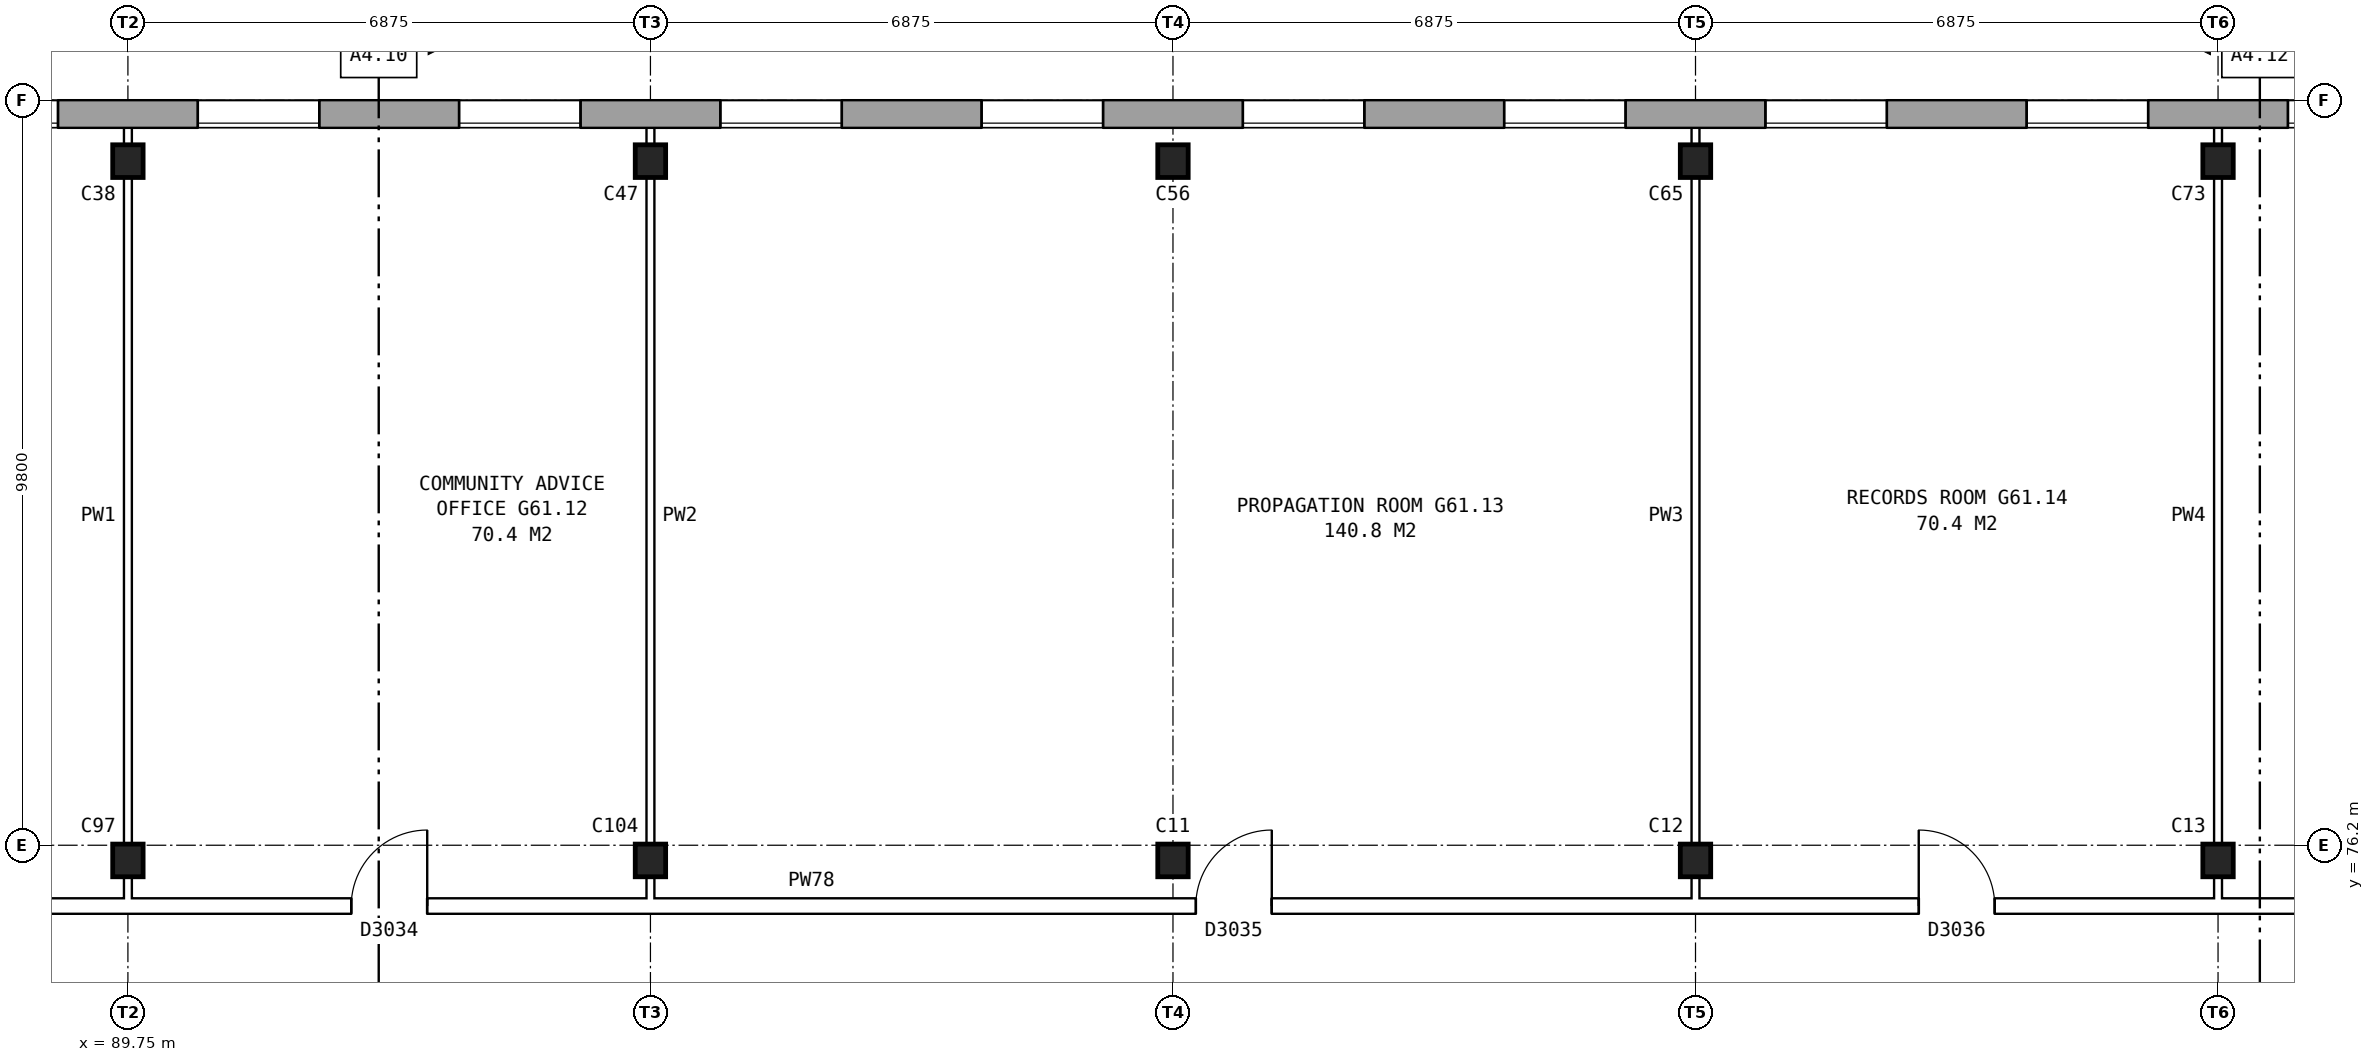
"""IFC4 building model, lengths in metres.
Left out: names, types, materials, properties, quantities, classifications, styles, units other than length and angle.
Written with IfcOpenShell. Run it as: python <this file> out.ifc"""

import sys

from ifc_helpers import new_model, si_unit, direction, frame, frame_2d, origin, origin_2d, place, context, subcontext, project, spatial, rectangle, i_section, extrude, element, fill, save


model = new_model("IFC4")
c1 = context("Model", 3, precision=1e-05, world=origin(), true_north=direction((0.0, 1.0)))
c2 = subcontext(c1, "Body", "Model", "MODEL_VIEW")
j1 = project(units=[si_unit("LENGTHUNIT", "METRE"), si_unit("PLANEANGLEUNIT", "RADIAN")], contexts=[c1])
p1 = place(None, origin())
s1 = spatial("IfcSite", under=j1, at=p1, CompositionType="ELEMENT")
p2 = place(p1, origin())
s2 = spatial("IfcBuilding", under=s1, at=p2, CompositionType="ELEMENT")
p3 = place(p2, frame((0.0, 0.0, 215.2)))
s3 = spatial("IfcBuildingStorey", under=s2, at=p3, CompositionType="ELEMENT", Elevation=215.2)
for number, where, z_axis, x_axis in (
    (1, (89.75, 76.0, 0.0), (0.0, 0.0, 1.0), (1.0, 0.0, 0.0)),
    (2, (96.625, 76.0, 0.0), (0.0, 0.0, 1.0), (1.0, 0.0, 0.0)),
    (3, (103.5, 76.0, 0.0), (0.0, 0.0, 1.0), (1.0, 0.0, 0.0)),
    (4, (110.375, 76.0, 0.0), (0.0, 0.0, 1.0), (1.0, 0.0, 0.0)),
    (5, (117.25, 76.0, 0.0), (0.0, 0.0, 1.0), (1.0, 0.0, 0.0)),
    (6, (89.75, 85.2, 0.0), (0.0, 0.0, 1.0), (1.0, 0.0, 0.0)),
    (7, (96.625, 85.2, 0.0), (0.0, 0.0, 1.0), (1.0, 0.0, 0.0)),
    (8, (103.5, 85.2, 0.0), (0.0, 0.0, 1.0), (1.0, 0.0, 0.0)),
    (9, (110.375, 85.2, 0.0), (0.0, 0.0, 1.0), (1.0, 0.0, 0.0)),
    (10, (117.25, 85.2, 0.0), (0.0, 0.0, 1.0), (1.0, 0.0, 0.0)),
):
    element("IfcColumn", number, at=place(p3, frame(where, z_axis=z_axis, x_axis=x_axis)), inside=s3, PredefinedType="COLUMN", context=c2, shape_type="SweptSolid", body=[
        extrude(i_section(OverallWidth=0.4, OverallDepth=0.43, WebThickness=0.04, FlangeThickness=0.04, at=origin_2d()), origin(), (0.0, 0.0, 1.0), 5.6),
    ])
p4 = place(p3, frame((131.05, 85.82, 0.0), z_axis=(0.0, 0.0, 1.0), x_axis=(-1.0, 0.0, 0.0)))
e11 = element("IfcWall", 11, at=p4, inside=s3, PredefinedType="STANDARD", context=c2, shape_type="SweptSolid", body=[
    extrude(rectangle(XDim=55.1, YDim=0.36, at=frame_2d((27.55, 0.0))), origin(), (0.0, 0.0, 1.0), 5.6),
])
p5 = place(p4, frame((0.969, 0.0, 0.15)))
e12 = element("IfcOpeningElement", 12, at=p5, cuts=e11, PredefinedType="OPENING", context=c2, shape_type="SweptSolid", body=[
    extrude(rectangle(XDim=1.6, YDim=2.4, at=frame_2d((0.8, 1.2))), frame((0.0, 0.19, 0.0), z_axis=(0.0, -1.0, 0.0), x_axis=(1.0, 0.0, 0.0)), (0.0, 0.0, 1.0), 0.38),
])
p6 = place(p4, frame((4.406, 0.0, 0.15)))
e13 = element("IfcOpeningElement", 13, at=p6, cuts=e11, PredefinedType="OPENING", context=c2, shape_type="SweptSolid", body=[
    extrude(rectangle(XDim=1.6, YDim=2.4, at=frame_2d((0.8, 1.2))), frame((0.0, 0.19, 0.0), z_axis=(0.0, -1.0, 0.0), x_axis=(1.0, 0.0, 0.0)), (0.0, 0.0, 1.0), 0.38),
])
p7 = place(p4, frame((7.844, 0.0, 0.15)))
e14 = element("IfcOpeningElement", 14, at=p7, cuts=e11, PredefinedType="OPENING", context=c2, shape_type="SweptSolid", body=[
    extrude(rectangle(XDim=1.6, YDim=2.4, at=frame_2d((0.8, 1.2))), frame((0.0, 0.19, 0.0), z_axis=(0.0, -1.0, 0.0), x_axis=(1.0, 0.0, 0.0)), (0.0, 0.0, 1.0), 0.38),
])
p8 = place(p4, frame((11.281, 0.0, 0.15)))
e15 = element("IfcOpeningElement", 15, at=p8, cuts=e11, PredefinedType="OPENING", context=c2, shape_type="SweptSolid", body=[
    extrude(rectangle(XDim=1.6, YDim=2.4, at=frame_2d((0.8, 1.2))), frame((0.0, 0.19, 0.0), z_axis=(0.0, -1.0, 0.0), x_axis=(1.0, 0.0, 0.0)), (0.0, 0.0, 1.0), 0.38),
])
p9 = place(p4, frame((14.719, 0.0, 0.15)))
e16 = element("IfcOpeningElement", 16, at=p9, cuts=e11, PredefinedType="OPENING", context=c2, shape_type="SweptSolid", body=[
    extrude(rectangle(XDim=1.6, YDim=2.4, at=frame_2d((0.8, 1.2))), frame((0.0, 0.19, 0.0), z_axis=(0.0, -1.0, 0.0), x_axis=(1.0, 0.0, 0.0)), (0.0, 0.0, 1.0), 0.38),
])
p10 = place(p4, frame((18.156, 0.0, 0.15)))
e17 = element("IfcOpeningElement", 17, at=p10, cuts=e11, PredefinedType="OPENING", context=c2, shape_type="SweptSolid", body=[
    extrude(rectangle(XDim=1.6, YDim=2.4, at=frame_2d((0.8, 1.2))), frame((0.0, 0.19, 0.0), z_axis=(0.0, -1.0, 0.0), x_axis=(1.0, 0.0, 0.0)), (0.0, 0.0, 1.0), 0.38),
])
p11 = place(p4, frame((21.594, 0.0, 0.15)))
e18 = element("IfcOpeningElement", 18, at=p11, cuts=e11, PredefinedType="OPENING", context=c2, shape_type="SweptSolid", body=[
    extrude(rectangle(XDim=1.6, YDim=2.4, at=frame_2d((0.8, 1.2))), frame((0.0, 0.19, 0.0), z_axis=(0.0, -1.0, 0.0), x_axis=(1.0, 0.0, 0.0)), (0.0, 0.0, 1.0), 0.38),
])
p12 = place(p4, frame((25.031, 0.0, 0.15)))
e19 = element("IfcOpeningElement", 19, at=p12, cuts=e11, PredefinedType="OPENING", context=c2, shape_type="SweptSolid", body=[
    extrude(rectangle(XDim=1.6, YDim=2.4, at=frame_2d((0.8, 1.2))), frame((0.0, 0.19, 0.0), z_axis=(0.0, -1.0, 0.0), x_axis=(1.0, 0.0, 0.0)), (0.0, 0.0, 1.0), 0.38),
])
p13 = place(p4, frame((28.469, 0.0, 0.15)))
e20 = element("IfcOpeningElement", 20, at=p13, cuts=e11, PredefinedType="OPENING", context=c2, shape_type="SweptSolid", body=[
    extrude(rectangle(XDim=1.6, YDim=2.4, at=frame_2d((0.8, 1.2))), frame((0.0, 0.19, 0.0), z_axis=(0.0, -1.0, 0.0), x_axis=(1.0, 0.0, 0.0)), (0.0, 0.0, 1.0), 0.38),
])
p14 = place(p4, frame((31.906, 0.0, 0.15)))
e21 = element("IfcOpeningElement", 21, at=p14, cuts=e11, PredefinedType="OPENING", context=c2, shape_type="SweptSolid", body=[
    extrude(rectangle(XDim=1.6, YDim=2.4, at=frame_2d((0.8, 1.2))), frame((0.0, 0.19, 0.0), z_axis=(0.0, -1.0, 0.0), x_axis=(1.0, 0.0, 0.0)), (0.0, 0.0, 1.0), 0.38),
])
p15 = place(p4, frame((35.344, 0.0, 0.15)))
e22 = element("IfcOpeningElement", 22, at=p15, cuts=e11, PredefinedType="OPENING", context=c2, shape_type="SweptSolid", body=[
    extrude(rectangle(XDim=1.6, YDim=2.4, at=frame_2d((0.8, 1.2))), frame((0.0, 0.19, 0.0), z_axis=(0.0, -1.0, 0.0), x_axis=(1.0, 0.0, 0.0)), (0.0, 0.0, 1.0), 0.38),
])
p16 = place(p4, frame((38.781, 0.0, 0.15)))
e23 = element("IfcOpeningElement", 23, at=p16, cuts=e11, PredefinedType="OPENING", context=c2, shape_type="SweptSolid", body=[
    extrude(rectangle(XDim=1.6, YDim=2.4, at=frame_2d((0.8, 1.2))), frame((0.0, 0.19, 0.0), z_axis=(0.0, -1.0, 0.0), x_axis=(1.0, 0.0, 0.0)), (0.0, 0.0, 1.0), 0.38),
])
p17 = place(p4, frame((42.219, 0.0, 0.15)))
e24 = element("IfcOpeningElement", 24, at=p17, cuts=e11, PredefinedType="OPENING", context=c2, shape_type="SweptSolid", body=[
    extrude(rectangle(XDim=1.6, YDim=2.4, at=frame_2d((0.8, 1.2))), frame((0.0, 0.19, 0.0), z_axis=(0.0, -1.0, 0.0), x_axis=(1.0, 0.0, 0.0)), (0.0, 0.0, 1.0), 0.38),
])
p18 = place(p4, frame((45.656, 0.0, 0.15)))
e25 = element("IfcOpeningElement", 25, at=p18, cuts=e11, PredefinedType="OPENING", context=c2, shape_type="SweptSolid", body=[
    extrude(rectangle(XDim=1.6, YDim=2.4, at=frame_2d((0.8, 1.2))), frame((0.0, 0.19, 0.0), z_axis=(0.0, -1.0, 0.0), x_axis=(1.0, 0.0, 0.0)), (0.0, 0.0, 1.0), 0.38),
])
p19 = place(p4, frame((49.094, 0.0, 0.15)))
e26 = element("IfcOpeningElement", 26, at=p19, cuts=e11, PredefinedType="OPENING", context=c2, shape_type="SweptSolid", body=[
    extrude(rectangle(XDim=1.6, YDim=2.4, at=frame_2d((0.8, 1.2))), frame((0.0, 0.19, 0.0), z_axis=(0.0, -1.0, 0.0), x_axis=(1.0, 0.0, 0.0)), (0.0, 0.0, 1.0), 0.38),
])
p20 = place(p4, frame((52.531, 0.0, 0.15)))
e27 = element("IfcOpeningElement", 27, at=p20, cuts=e11, PredefinedType="OPENING", context=c2, shape_type="SweptSolid", body=[
    extrude(rectangle(XDim=1.6, YDim=2.4, at=frame_2d((0.8, 1.2))), frame((0.0, 0.19, 0.0), z_axis=(0.0, -1.0, 0.0), x_axis=(1.0, 0.0, 0.0)), (0.0, 0.0, 1.0), 0.38),
])
p21 = place(p3, frame((75.64, 75.4, 0.0), z_axis=(0.0, 0.0, 1.0), x_axis=(1.0, 0.0, 0.0)))
e28 = element("IfcWall", 28, at=p21, inside=s3, PredefinedType="PARTITIONING", context=c2, shape_type="SweptSolid", body=[
    extrude(rectangle(XDim=55.72, YDim=0.2, at=frame_2d((27.86, 0.0))), origin(), (0.0, 0.0, 1.0), 5.6),
])
p22 = place(p21, frame((5.955, 0.0, 0.0)))
e29 = element("IfcOpeningElement", 29, at=p22, cuts=e28, PredefinedType="OPENING", context=c2, shape_type="SweptSolid", body=[
    extrude(rectangle(XDim=1.0, YDim=2.1, at=frame_2d((0.5, 1.05))), frame((0.0, 0.11, 0.0), z_axis=(0.0, -1.0, 0.0), x_axis=(1.0, 0.0, 0.0)), (0.0, 0.0, 1.0), 0.22),
])
p23 = place(p21, frame((17.048, 0.0, 0.0)))
e30 = element("IfcOpeningElement", 30, at=p23, cuts=e28, PredefinedType="OPENING", context=c2, shape_type="SweptSolid", body=[
    extrude(rectangle(XDim=1.0, YDim=2.1, at=frame_2d((0.5, 1.05))), frame((0.0, 0.11, 0.0), z_axis=(0.0, -1.0, 0.0), x_axis=(1.0, 0.0, 0.0)), (0.0, 0.0, 1.0), 0.22),
])
p24 = place(p21, frame((28.16, 0.0, 0.0)))
e31 = element("IfcOpeningElement", 31, at=p24, cuts=e28, PredefinedType="OPENING", context=c2, shape_type="SweptSolid", body=[
    extrude(rectangle(XDim=1.0, YDim=2.1, at=frame_2d((0.5, 1.05))), frame((0.0, 0.11, 0.0), z_axis=(0.0, -1.0, 0.0), x_axis=(1.0, 0.0, 0.0)), (0.0, 0.0, 1.0), 0.22),
])
p25 = place(p21, frame((37.672, 0.0, 0.0)))
e32 = element("IfcOpeningElement", 32, at=p25, cuts=e28, PredefinedType="OPENING", context=c2, shape_type="SweptSolid", body=[
    extrude(rectangle(XDim=1.0, YDim=2.1, at=frame_2d((0.5, 1.05))), frame((0.0, 0.11, 0.0), z_axis=(0.0, -1.0, 0.0), x_axis=(1.0, 0.0, 0.0)), (0.0, 0.0, 1.0), 0.22),
])
p26 = place(p21, frame((48.765, 0.0, 0.0)))
e33 = element("IfcOpeningElement", 33, at=p26, cuts=e28, PredefinedType="OPENING", context=c2, shape_type="SweptSolid", body=[
    extrude(rectangle(XDim=1.0, YDim=2.1, at=frame_2d((0.5, 1.05))), frame((0.0, 0.11, 0.0), z_axis=(0.0, -1.0, 0.0), x_axis=(1.0, 0.0, 0.0)), (0.0, 0.0, 1.0), 0.22),
])
for number, where, z_axis, x_axis in (
    (34, (89.75, 75.3, 0.0), (0.0, 0.0, 1.0), (0.0, 1.0, 0.0)),
    (35, (96.625, 75.3, 0.0), (0.0, 0.0, 1.0), (0.0, 1.0, 0.0)),
    (36, (110.375, 75.3, 0.0), (0.0, 0.0, 1.0), (0.0, 1.0, 0.0)),
    (37, (117.25, 75.3, 0.0), (0.0, 0.0, 1.0), (0.0, 1.0, 0.0)),
):
    element("IfcWall", number, at=place(p3, frame(where, z_axis=z_axis, x_axis=x_axis)), inside=s3, PredefinedType="PARTITIONING", context=c2, shape_type="SweptSolid", body=[
        extrude(rectangle(XDim=10.46, YDim=0.1, at=frame_2d((5.23, 0.0))), origin(), (0.0, 0.0, 1.0), 4.988),
    ])
p27 = place(p8, origin())
e38 = element("IfcWindow", 38, at=p27, inside=s3, PartitioningType="SINGLE_PANEL", PredefinedType="WINDOW", context=c2, shape_type="SweptSolid", body=[
    extrude(rectangle(XDim=1.6, YDim=2.4, at=frame_2d((0.8, 1.2))), frame((0.0, 0.15, 0.0), z_axis=(0.0, -1.0, 0.0), x_axis=(1.0, 0.0, 0.0)), (0.0, 0.0, 1.0), 0.06),
])
fill(e15, e38)
p28 = place(p9, origin())
e39 = element("IfcWindow", 39, at=p28, inside=s3, PartitioningType="SINGLE_PANEL", PredefinedType="WINDOW", context=c2, shape_type="SweptSolid", body=[
    extrude(rectangle(XDim=1.6, YDim=2.4, at=frame_2d((0.8, 1.2))), frame((0.0, 0.15, 0.0), z_axis=(0.0, -1.0, 0.0), x_axis=(1.0, 0.0, 0.0)), (0.0, 0.0, 1.0), 0.06),
])
fill(e16, e39)
p29 = place(p10, origin())
e40 = element("IfcWindow", 40, at=p29, inside=s3, PartitioningType="SINGLE_PANEL", PredefinedType="WINDOW", context=c2, shape_type="SweptSolid", body=[
    extrude(rectangle(XDim=1.6, YDim=2.4, at=frame_2d((0.8, 1.2))), frame((0.0, 0.15, 0.0), z_axis=(0.0, -1.0, 0.0), x_axis=(1.0, 0.0, 0.0)), (0.0, 0.0, 1.0), 0.06),
])
fill(e17, e40)
p30 = place(p11, origin())
e41 = element("IfcWindow", 41, at=p30, inside=s3, PartitioningType="SINGLE_PANEL", PredefinedType="WINDOW", context=c2, shape_type="SweptSolid", body=[
    extrude(rectangle(XDim=1.6, YDim=2.4, at=frame_2d((0.8, 1.2))), frame((0.0, 0.15, 0.0), z_axis=(0.0, -1.0, 0.0), x_axis=(1.0, 0.0, 0.0)), (0.0, 0.0, 1.0), 0.06),
])
fill(e18, e41)
p31 = place(p12, origin())
e42 = element("IfcWindow", 42, at=p31, inside=s3, PartitioningType="SINGLE_PANEL", PredefinedType="WINDOW", context=c2, shape_type="SweptSolid", body=[
    extrude(rectangle(XDim=1.6, YDim=2.4, at=frame_2d((0.8, 1.2))), frame((0.0, 0.15, 0.0), z_axis=(0.0, -1.0, 0.0), x_axis=(1.0, 0.0, 0.0)), (0.0, 0.0, 1.0), 0.06),
])
fill(e19, e42)
p32 = place(p13, origin())
e43 = element("IfcWindow", 43, at=p32, inside=s3, PartitioningType="SINGLE_PANEL", PredefinedType="WINDOW", context=c2, shape_type="SweptSolid", body=[
    extrude(rectangle(XDim=1.6, YDim=2.4, at=frame_2d((0.8, 1.2))), frame((0.0, 0.15, 0.0), z_axis=(0.0, -1.0, 0.0), x_axis=(1.0, 0.0, 0.0)), (0.0, 0.0, 1.0), 0.06),
])
fill(e20, e43)
p33 = place(p14, origin())
e44 = element("IfcWindow", 44, at=p33, inside=s3, PartitioningType="SINGLE_PANEL", PredefinedType="WINDOW", context=c2, shape_type="SweptSolid", body=[
    extrude(rectangle(XDim=1.6, YDim=2.4, at=frame_2d((0.8, 1.2))), frame((0.0, 0.15, 0.0), z_axis=(0.0, -1.0, 0.0), x_axis=(1.0, 0.0, 0.0)), (0.0, 0.0, 1.0), 0.06),
])
fill(e21, e44)
p34 = place(p15, origin())
e45 = element("IfcWindow", 45, at=p34, inside=s3, PartitioningType="SINGLE_PANEL", PredefinedType="WINDOW", context=c2, shape_type="SweptSolid", body=[
    extrude(rectangle(XDim=1.6, YDim=2.4, at=frame_2d((0.8, 1.2))), frame((0.0, 0.15, 0.0), z_axis=(0.0, -1.0, 0.0), x_axis=(1.0, 0.0, 0.0)), (0.0, 0.0, 1.0), 0.06),
])
fill(e22, e45)
p35 = place(p16, origin())
e46 = element("IfcWindow", 46, at=p35, inside=s3, PartitioningType="SINGLE_PANEL", PredefinedType="WINDOW", context=c2, shape_type="SweptSolid", body=[
    extrude(rectangle(XDim=1.6, YDim=2.4, at=frame_2d((0.8, 1.2))), frame((0.0, 0.15, 0.0), z_axis=(0.0, -1.0, 0.0), x_axis=(1.0, 0.0, 0.0)), (0.0, 0.0, 1.0), 0.06),
])
fill(e23, e46)
p36 = place(p17, origin())
e47 = element("IfcWindow", 47, at=p36, inside=s3, PartitioningType="SINGLE_PANEL", PredefinedType="WINDOW", context=c2, shape_type="SweptSolid", body=[
    extrude(rectangle(XDim=1.6, YDim=2.4, at=frame_2d((0.8, 1.2))), frame((0.0, 0.15, 0.0), z_axis=(0.0, -1.0, 0.0), x_axis=(1.0, 0.0, 0.0)), (0.0, 0.0, 1.0), 0.06),
])
fill(e24, e47)
p37 = place(p23, origin())
e48 = element("IfcDoor", 48, at=p37, inside=s3, OperationType="SINGLE_SWING_RIGHT", PredefinedType="DOOR", context=c2, shape_type="SweptSolid", body=[
    extrude(rectangle(XDim=1.0, YDim=2.1, at=frame_2d((0.5, 1.05))), frame((0.0, 0.025, 0.0), z_axis=(0.0, -1.0, 0.0), x_axis=(1.0, 0.0, 0.0)), (0.0, 0.0, 1.0), 0.05),
])
fill(e30, e48)
p38 = place(p24, origin())
e49 = element("IfcDoor", 49, at=p38, inside=s3, OperationType="SINGLE_SWING_RIGHT", PredefinedType="DOOR", context=c2, shape_type="SweptSolid", body=[
    extrude(rectangle(XDim=1.0, YDim=2.1, at=frame_2d((0.5, 1.05))), frame((0.0, 0.025, 0.0), z_axis=(0.0, -1.0, 0.0), x_axis=(1.0, 0.0, 0.0)), (0.0, 0.0, 1.0), 0.05),
])
fill(e31, e49)
p39 = place(p25, origin())
e50 = element("IfcDoor", 50, at=p39, inside=s3, OperationType="SINGLE_SWING_LEFT", PredefinedType="DOOR", context=c2, shape_type="SweptSolid", body=[
    extrude(rectangle(XDim=1.0, YDim=2.1, at=frame_2d((0.5, 1.05))), frame((0.0, 0.025, 0.0), z_axis=(0.0, -1.0, 0.0), x_axis=(1.0, 0.0, 0.0)), (0.0, 0.0, 1.0), 0.05),
])
fill(e32, e50)
save(model, sys.argv[1])
